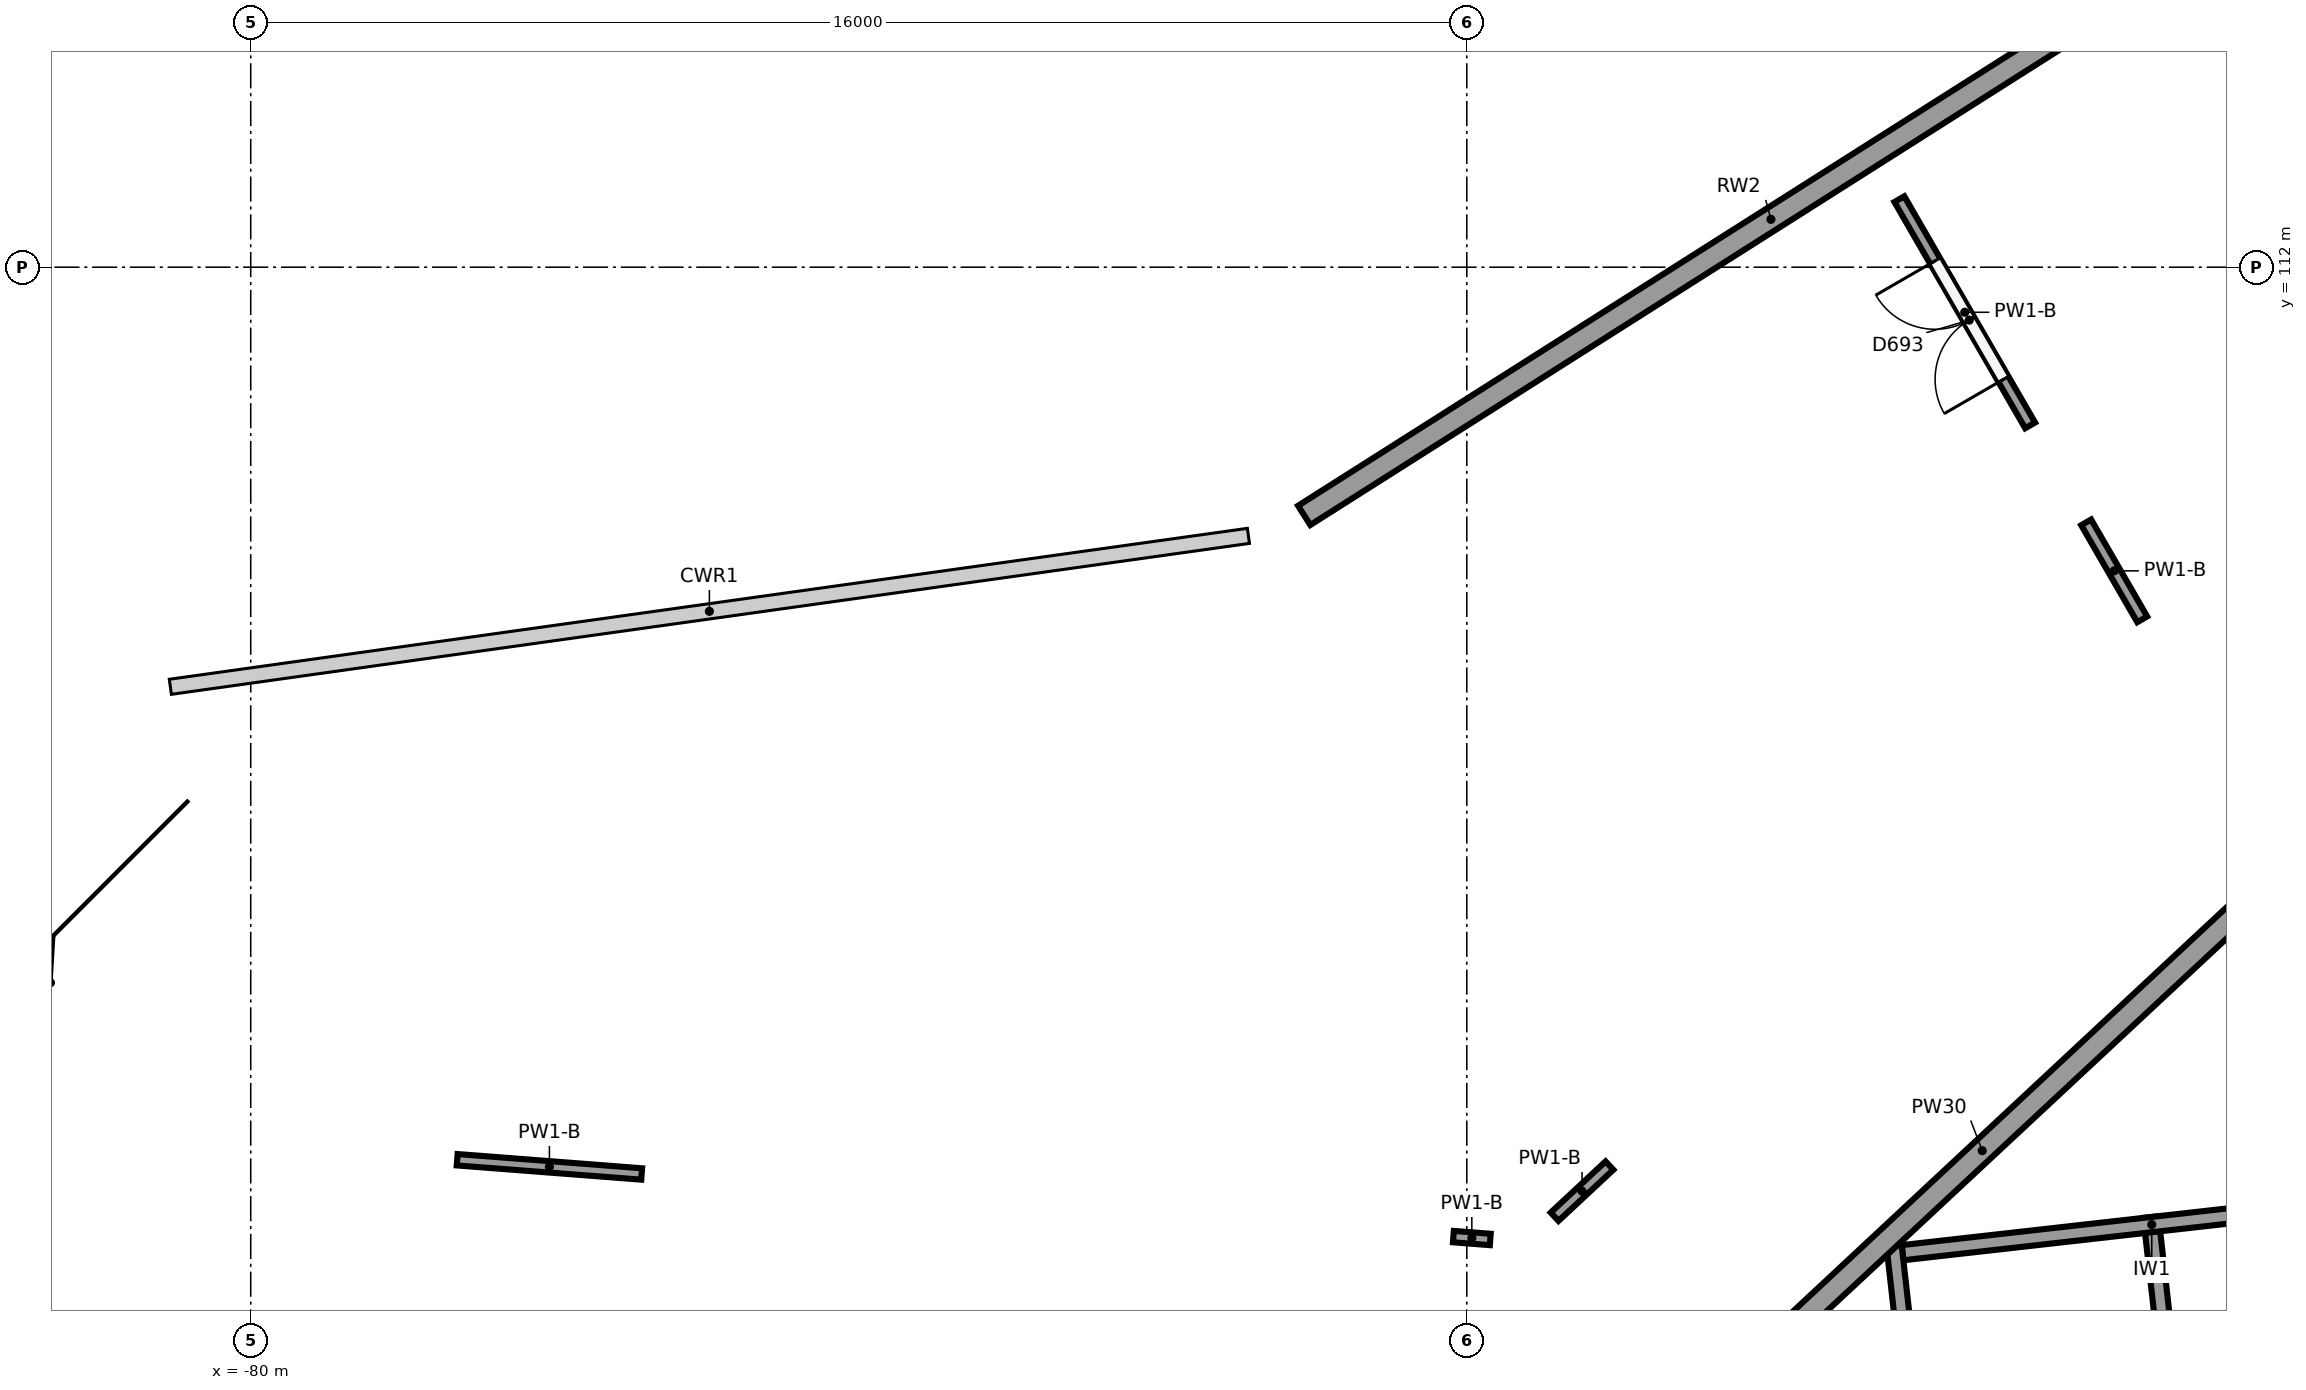
"""IFC4 building model, lengths in metres.
Left out: names, types, materials, properties, quantities, classifications, styles, units other than length and angle.
Written with IfcOpenShell. Run it as: python <this file> out.ifc"""

import sys

from ifc_helpers import new_model, si_unit, direction, frame, frame_2d, origin, origin_2d, place, context, subcontext, project, spatial, rectangle, circle, extrude, element, fill, save


model = new_model("IFC4")
c1 = context("Model", 3, precision=1e-05, world=origin(), true_north=direction((0.0, 1.0)))
c2 = subcontext(c1, "Body", "Model", "MODEL_VIEW")
j1 = project(units=[si_unit("LENGTHUNIT", "METRE"), si_unit("PLANEANGLEUNIT", "RADIAN")], contexts=[c1])
p1 = place(None, origin())
s1 = spatial("IfcSite", under=j1, at=p1, CompositionType="ELEMENT")
p2 = place(p1, origin())
s2 = spatial("IfcBuilding", under=s1, at=p2, CompositionType="ELEMENT")
p3 = place(p2, frame((0.0, 0.0, 6.5)))
s3 = spatial("IfcBuildingStorey", under=s2, at=p3, CompositionType="ELEMENT", Elevation=6.5)
for number, where, z_axis, x_axis in (
    (1, (-63.373, 99.648, 0.0), (0.0, 0.0, 1.0), (1.0, 0.0, 0.0)),
    (2, (-64.694, 103.424, 0.0), (0.0, 0.0, 1.0), (1.0, 0.0, 0.0)),
    (3, (-66.477, 108.521, 0.0), (0.0, 0.0, 1.0), (1.0, 0.0, 0.0)),
    (4, (-77.187, 99.634, 0.0), (0.0, 0.0, 1.0), (1.0, 0.0, 0.0)),
    (5, (-78.581, 101.852, 0.0), (0.0, 0.0, 1.0), (1.0, 0.0, 0.0)),
    (6, (-81.454, 106.424, 0.0), (0.0, 0.0, 1.0), (1.0, 0.0, 0.0)),
):
    element("IfcColumn", number, at=place(p3, frame(where, z_axis=z_axis, x_axis=x_axis)), inside=s3, PredefinedType="COLUMN", context=c2, shape_type="SweptSolid", body=[
        extrude(circle(Radius=0.4, at=origin_2d()), origin(), (0.0, 0.0, 1.0), 5.5),
    ])
p4 = place(p3, frame((-66.139, 108.735, 0.0), z_axis=(0.0, 0.0, 1.0), x_axis=(0.844493393786, 0.535565969654, 0.0)))
e7 = element("IfcWall", 7, at=p4, inside=s3, PredefinedType="SOLIDWALL", context=c2, shape_type="SweptSolid", body=[
    extrude(rectangle(XDim=14.544, YDim=0.3, at=frame_2d((7.272, 0.0))), origin(), (0.0, 0.0, 1.0), 3.85),
])
p5 = place(p3, frame((-81.038, 99.532, 0.0), z_axis=(0.0, 0.0, 1.0), x_axis=(1.0, 0.0, 0.0)))
e8 = element("IfcColumn", 8, at=p5, inside=s3, PredefinedType="COLUMN", context=c2, shape_type="SweptSolid", body=[
    extrude(circle(Radius=0.3, at=origin_2d()), origin(), (0.0, 0.0, 1.0), 4.429),
])
p6 = place(p3, frame((-82.675, 102.138, 0.0), z_axis=(0.0, 0.0, 1.0), x_axis=(1.0, 0.0, 0.0)))
e9 = element("IfcColumn", 9, at=p6, inside=s3, PredefinedType="COLUMN", context=c2, shape_type="SweptSolid", body=[
    extrude(circle(Radius=0.3, at=origin_2d()), origin(), (0.0, 0.0, 1.0), 4.465),
])
p7 = place(p3, frame((-61.723, 96.179, 0.0), z_axis=(0.0, 0.0, 1.0), x_axis=(0.731540985517, 0.681797467368, 0.0)))
e10 = element("IfcWall", 10, at=p7, inside=s3, PredefinedType="SOLIDWALL", context=c2, shape_type="SweptSolid", body=[
    extrude(rectangle(XDim=12.314, YDim=0.3, at=frame_2d((6.157, 0.0))), origin(), (0.0, 0.0, 1.0), 3.85),
])
p8 = place(p3, frame((-58.378, 99.123, 0.0), z_axis=(0.0, 0.0, 1.0), x_axis=(0.111982724367, -0.993710153638, 0.0)))
e11 = element("IfcWall", 11, at=p8, inside=s3, PredefinedType="SHEAR", context=c2, shape_type="SweptSolid", body=[
    extrude(rectangle(XDim=7.6, YDim=0.2, at=frame_2d((3.8, 0.0))), origin(), (0.0, 0.0, 1.0), 5.15),
])
p9 = place(p3, frame((-51.709, 99.774, 0.0), z_axis=(0.0, 0.0, 1.0), x_axis=(-0.993715690617, -0.111933579504, 0.0)))
e12 = element("IfcWall", 12, at=p9, inside=s3, PredefinedType="SHEAR", context=c2, shape_type="SweptSolid", body=[
    extrude(rectangle(XDim=6.6, YDim=0.2, at=frame_2d((3.3, 0.0))), origin(), (0.0, 0.0, 1.0), 5.15),
])
p10 = place(p3, frame((-54.999, 99.504, 0.0), z_axis=(0.0, 0.0, 1.0), x_axis=(0.111982724367, -0.993710153638, 0.0)))
e13 = element("IfcWall", 13, at=p10, inside=s3, PredefinedType="SHEAR", context=c2, shape_type="SweptSolid", body=[
    extrude(rectangle(XDim=7.6, YDim=0.2, at=frame_2d((3.8, 0.0))), origin(), (0.0, 0.0, 1.0), 5.15),
])
p11 = place(p3, frame((-55.114, 107.367, 0.0), z_axis=(0.0, 0.0, 1.0), x_axis=(-0.500539815233, 0.865713516913, 0.0)))
e14 = element("IfcWall", 14, at=p11, inside=s3, PredefinedType="PARTITIONING", context=c2, shape_type="SweptSolid", body=[
    extrude(rectangle(XDim=1.473, YDim=0.15, at=frame_2d((0.737, 0.0))), origin(), (0.0, 0.0, 1.0), 5.05),
])
p12 = place(p3, frame((-56.588, 109.919, 0.0), z_axis=(0.0, 0.0, 1.0), x_axis=(-0.500453880067, 0.865763197373, 0.0)))
e15 = element("IfcWall", 15, at=p12, inside=s3, PredefinedType="PARTITIONING", context=c2, shape_type="SweptSolid", body=[
    extrude(rectangle(XDim=3.438, YDim=0.15, at=frame_2d((1.719, 0.0))), origin(), (0.0, 0.0, 1.0), 5.05),
])
p13 = place(p12, frame((0.7, 0.0, 0.0)))
e16 = element("IfcOpeningElement", 16, at=p13, cuts=e15, PredefinedType="OPENING", context=c2, shape_type="SweptSolid", body=[
    extrude(rectangle(XDim=1.8, YDim=2.1, at=frame_2d((0.9, 1.05))), frame((0.0, 0.085, 0.0), z_axis=(0.0, -1.0, 0.0), x_axis=(1.0, 0.0, 0.0)), (0.0, 0.0, 1.0), 0.17),
])
p14 = place(p3, frame((-62.123, 100.18, 0.0), z_axis=(0.0, 0.0, 1.0), x_axis=(-0.731655638736, -0.681674428379, 0.0)))
e17 = element("IfcWall", 17, at=p14, inside=s3, PredefinedType="PARTITIONING", context=c2, shape_type="SweptSolid", body=[
    extrude(rectangle(XDim=0.987, YDim=0.15, at=frame_2d((0.493, 0.0))), origin(), (0.0, 0.0, 1.0), 5.05),
])
p15 = place(p3, frame((-63.691, 99.209, 0.0), z_axis=(0.0, 0.0, 1.0), x_axis=(-0.997054485502, 0.076696498885, 0.0)))
e18 = element("IfcWall", 18, at=p15, inside=s3, PredefinedType="PARTITIONING", context=c2, shape_type="SweptSolid", body=[
    extrude(rectangle(XDim=0.487, YDim=0.15, at=frame_2d((0.244, 0.0))), origin(), (0.0, 0.0, 1.0), 5.05),
])
p16 = place(p3, frame((-74.856, 100.07, 0.0), z_axis=(0.0, 0.0, 1.0), x_axis=(-0.99703735319, 0.076918894578, 0.0)))
e19 = element("IfcWall", 19, at=p16, inside=s3, PredefinedType="PARTITIONING", context=c2, shape_type="SweptSolid", body=[
    extrude(rectangle(XDim=2.435, YDim=0.15, at=frame_2d((1.217, 0.0))), origin(), (0.0, 0.0, 1.0), 5.05),
])
p17 = place(p13, origin())
e20 = element("IfcDoor", 20, at=p17, inside=s3, OperationType="DOUBLE_DOOR_SINGLE_SWING", PredefinedType="DOOR", context=c2, shape_type="SweptSolid", body=[
    extrude(rectangle(XDim=1.8, YDim=2.1, at=frame_2d((0.9, 1.05))), frame((0.0, 0.025, 0.0), z_axis=(0.0, -1.0, 0.0), x_axis=(1.0, 0.0, 0.0)), (0.0, 0.0, 1.0), 0.05),
])
fill(e16, e20)
save(model, sys.argv[1])
